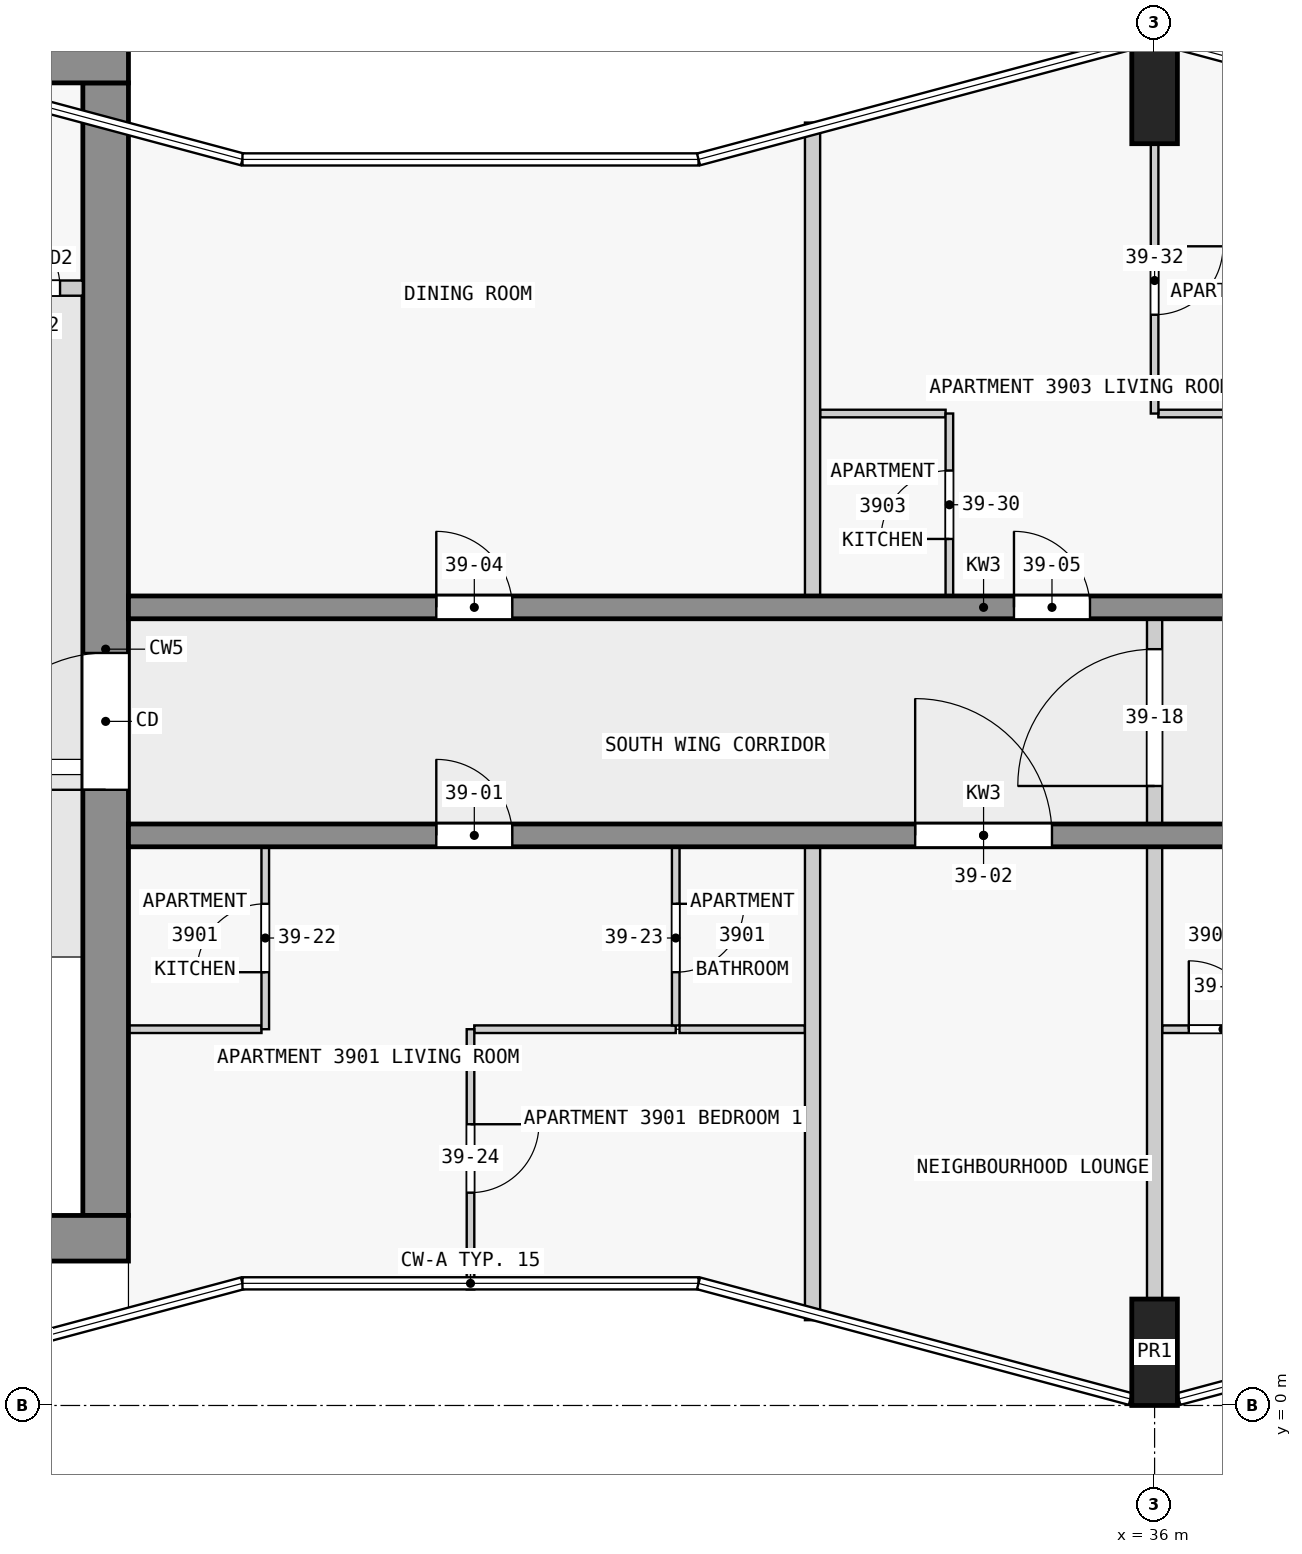
"""IFC4 building model, lengths in metres.
Left out: names, types, materials, properties, quantities, classifications, styles, units other than length and angle.
Written with IfcOpenShell. Run it as: python <this file> out.ifc"""

import sys

from ifc_helpers import new_model, si_unit, direction, frame, frame_2d, origin, origin_2d, place, context, subcontext, project, spatial, rectangle, extrude, element, fill, save


model = new_model("IFC4")
c1 = context("Model", 3, precision=1e-05, world=origin(), true_north=direction((0.0, 1.0)))
c2 = subcontext(c1, "Body", "Model", "MODEL_VIEW")
j1 = project(units=[si_unit("LENGTHUNIT", "METRE"), si_unit("PLANEANGLEUNIT", "RADIAN")], contexts=[c1])
p1 = place(None, origin())
s1 = spatial("IfcSite", under=j1, at=p1, CompositionType="ELEMENT")
p2 = place(p1, origin())
s2 = spatial("IfcBuilding", under=s1, at=p2, CompositionType="ELEMENT")
p3 = place(p2, frame((0.0, 0.0, 153.4)))
s3 = spatial("IfcBuildingStorey", under=s2, at=p3, CompositionType="ELEMENT", Elevation=153.4)
for number, where, z_axis, x_axis in (
    (1, (36.0, 0.7, 0.0), (0.0, 0.0, 1.0), (1.0, 0.0, 0.0)),
    (2, (36.0, 17.3, 0.0), (0.0, 0.0, 1.0), (1.0, 0.0, 0.0)),
):
    element("IfcColumn", number, at=place(p3, frame(where, z_axis=z_axis, x_axis=x_axis)), inside=s3, PredefinedType="COLUMN", context=c2, shape_type="SweptSolid", body=[
        extrude(rectangle(XDim=0.6, YDim=1.4, at=origin_2d()), origin(), (0.0, 0.0, 1.0), 3.5),
    ])
p4 = place(p3, frame((1.7, 2.2, 0.0), z_axis=(0.0, 0.0, 1.0), x_axis=(1.0, 0.0, 0.0)))
e3 = element("IfcWall", 3, at=p4, inside=s3, PredefinedType="SHEAR", context=c2, shape_type="SweptSolid", body=[
    extrude(rectangle(XDim=20.8, YDim=0.6, at=frame_2d((10.4, 0.0))), origin(), (0.0, 0.0, 1.0), 3.25),
])
p5 = place(p3, frame((1.38, 17.7, 0.0), z_axis=(0.0, 0.0, 1.0), x_axis=(1.0, 0.0, 0.0)))
e4 = element("IfcWall", 4, at=p5, inside=s3, PredefinedType="SHEAR", context=c2, shape_type="SweptSolid", body=[
    extrude(rectangle(XDim=21.12, YDim=0.6, at=frame_2d((10.56, 0.0))), origin(), (0.0, 0.0, 1.0), 3.25),
])
p6 = place(p5, frame((6.4, 0.0, 0.0)))
e5 = element("IfcOpeningElement", 5, at=p6, cuts=e4, PredefinedType="OPENING", context=c2, shape_type="SweptSolid", body=[
    extrude(rectangle(XDim=1.8, YDim=2.1, at=frame_2d((0.9, 1.05))), frame((0.0, 0.31, 0.0), z_axis=(0.0, -1.0, 0.0), x_axis=(1.0, 0.0, 0.0)), (0.0, 0.0, 1.0), 0.62),
])
p7 = place(p3, frame((22.2, 2.5, 0.0), z_axis=(0.0, 0.0, 1.0), x_axis=(0.0, 1.0, 0.0)))
e6 = element("IfcWall", 6, at=p7, inside=s3, PredefinedType="SHEAR", context=c2, shape_type="SweptSolid", body=[
    extrude(rectangle(XDim=14.9, YDim=0.6, at=frame_2d((7.45, 0.0))), origin(), (0.0, 0.0, 1.0), 3.25),
])
p8 = place(p7, frame((5.6, 0.0, 0.0)))
e7 = element("IfcOpeningElement", 7, at=p8, cuts=e6, PredefinedType="OPENING", context=c2, shape_type="SweptSolid", body=[
    extrude(rectangle(XDim=1.8, YDim=2.1, at=frame_2d((0.9, 1.05))), frame((0.0, 0.31, 0.0), z_axis=(0.0, -1.0, 0.0), x_axis=(1.0, 0.0, 0.0)), (0.0, 0.0, 1.0), 0.62),
])
p9 = place(p3, frame((22.5, 7.5, 0.0), z_axis=(0.0, 0.0, 1.0), x_axis=(1.0, 0.0, 0.0)))
e8 = element("IfcWall", 8, at=p9, inside=s3, PredefinedType="SHEAR", context=c2, shape_type="SweptSolid", body=[
    extrude(rectangle(XDim=22.5, YDim=0.3, at=frame_2d((11.25, 0.0))), origin(), (0.0, 0.0, 1.0), 3.25),
])
p10 = place(p9, frame((4.05, 0.0, 0.0)))
e9 = element("IfcOpeningElement", 9, at=p10, cuts=e8, PredefinedType="OPENING", context=c2, shape_type="SweptSolid", body=[
    extrude(rectangle(XDim=1.0, YDim=2.1, at=frame_2d((0.5, 1.05))), frame((0.0, 0.16, 0.0), z_axis=(0.0, -1.0, 0.0), x_axis=(1.0, 0.0, 0.0)), (0.0, 0.0, 1.0), 0.32),
])
p11 = place(p9, frame((10.35, 0.0, 0.0)))
e10 = element("IfcOpeningElement", 10, at=p11, cuts=e8, PredefinedType="OPENING", context=c2, shape_type="SweptSolid", body=[
    extrude(rectangle(XDim=1.8, YDim=2.1, at=frame_2d((0.9, 1.05))), frame((0.0, 0.16, 0.0), z_axis=(0.0, -1.0, 0.0), x_axis=(1.0, 0.0, 0.0)), (0.0, 0.0, 1.0), 0.32),
])
p12 = place(p9, frame((16.85, 0.0, 0.0)))
e11 = element("IfcOpeningElement", 11, at=p12, cuts=e8, PredefinedType="OPENING", context=c2, shape_type="SweptSolid", body=[
    extrude(rectangle(XDim=1.0, YDim=2.1, at=frame_2d((0.5, 1.05))), frame((0.0, 0.16, 0.0), z_axis=(0.0, -1.0, 0.0), x_axis=(1.0, 0.0, 0.0)), (0.0, 0.0, 1.0), 0.32),
])
p13 = place(p3, frame((22.5, 10.5, 0.0), z_axis=(0.0, 0.0, 1.0), x_axis=(1.0, 0.0, 0.0)))
e12 = element("IfcWall", 12, at=p13, inside=s3, PredefinedType="SHEAR", context=c2, shape_type="SweptSolid", body=[
    extrude(rectangle(XDim=22.5, YDim=0.3, at=frame_2d((11.25, 0.0))), origin(), (0.0, 0.0, 1.0), 3.25),
])
p14 = place(p13, frame((4.05, 0.0, 0.0)))
e13 = element("IfcOpeningElement", 13, at=p14, cuts=e12, PredefinedType="OPENING", context=c2, shape_type="SweptSolid", body=[
    extrude(rectangle(XDim=1.0, YDim=2.1, at=frame_2d((0.5, 1.05))), frame((0.0, 0.16, 0.0), z_axis=(0.0, -1.0, 0.0), x_axis=(1.0, 0.0, 0.0)), (0.0, 0.0, 1.0), 0.32),
])
p15 = place(p13, frame((11.65, 0.0, 0.0)))
e14 = element("IfcOpeningElement", 14, at=p15, cuts=e12, PredefinedType="OPENING", context=c2, shape_type="SweptSolid", body=[
    extrude(rectangle(XDim=1.0, YDim=2.1, at=frame_2d((0.5, 1.05))), frame((0.0, 0.16, 0.0), z_axis=(0.0, -1.0, 0.0), x_axis=(1.0, 0.0, 0.0)), (0.0, 0.0, 1.0), 0.32),
])
p16 = place(p13, frame((18.75, 0.0, 0.0)))
e15 = element("IfcOpeningElement", 15, at=p16, cuts=e12, PredefinedType="OPENING", context=c2, shape_type="SweptSolid", body=[
    extrude(rectangle(XDim=0.9, YDim=2.1, at=frame_2d((0.45, 1.05))), frame((0.0, 0.16, 0.0), z_axis=(0.0, -1.0, 0.0), x_axis=(1.0, 0.0, 0.0)), (0.0, 0.0, 1.0), 0.32),
])
p17 = place(p13, frame((20.95, 0.0, 0.0)))
e16 = element("IfcOpeningElement", 16, at=p17, cuts=e12, PredefinedType="OPENING", context=c2, shape_type="SweptSolid", body=[
    extrude(rectangle(XDim=1.0, YDim=2.1, at=frame_2d((0.5, 1.05))), frame((0.0, 0.16, 0.0), z_axis=(0.0, -1.0, 0.0), x_axis=(1.0, 0.0, 0.0)), (0.0, 0.0, 1.0), 0.32),
])
p18 = place(p3, frame((18.6, 14.7, 0.0), z_axis=(0.0, 0.0, 1.0), x_axis=(1.0, 0.0, 0.0)))
e17 = element("IfcWall", 17, at=p18, inside=s3, PredefinedType="PARTITIONING", context=c2, shape_type="SweptSolid", body=[
    extrude(rectangle(XDim=3.3, YDim=0.2, at=frame_2d((1.65, 0.0))), origin(), (0.0, 0.0, 1.0), 3.25),
])
p19 = place(p18, frame((0.45, 0.0, 0.0)))
e18 = element("IfcOpeningElement", 18, at=p19, cuts=e17, PredefinedType="OPENING", context=c2, shape_type="SweptSolid", body=[
    extrude(rectangle(XDim=0.9, YDim=2.1, at=frame_2d((0.45, 1.05))), frame((0.0, 0.11, 0.0), z_axis=(0.0, -1.0, 0.0), x_axis=(1.0, 0.0, 0.0)), (0.0, 0.0, 1.0), 0.22),
])
p20 = place(p18, frame((2.1, 0.0, 0.0)))
e19 = element("IfcOpeningElement", 19, at=p20, cuts=e17, PredefinedType="OPENING", context=c2, shape_type="SweptSolid", body=[
    extrude(rectangle(XDim=0.9, YDim=2.1, at=frame_2d((0.45, 1.05))), frame((0.0, 0.11, 0.0), z_axis=(0.0, -1.0, 0.0), x_axis=(1.0, 0.0, 0.0)), (0.0, 0.0, 1.0), 0.22),
])
p21 = place(p3, frame((29.7, 4.95, 0.0), z_axis=(0.0, 0.0, 1.0), x_axis=(-1.0, 0.0, 0.0)))
e20 = element("IfcWall", 20, at=p21, inside=s3, PredefinedType="PARTITIONING", context=c2, shape_type="SweptSolid", body=[
    extrude(rectangle(XDim=2.65, YDim=0.1, at=frame_2d((1.325, 0.0))), origin(), (0.0, 0.0, 1.0), 3.25),
])
p22 = place(p3, frame((22.5, 4.95, 0.0), z_axis=(0.0, 0.0, 1.0), x_axis=(1.0, 0.0, 0.0)))
e21 = element("IfcWall", 21, at=p22, inside=s3, PredefinedType="PARTITIONING", context=c2, shape_type="SweptSolid", body=[
    extrude(rectangle(XDim=1.75, YDim=0.1, at=frame_2d((0.875, 0.0))), origin(), (0.0, 0.0, 1.0), 3.25),
])
p23 = place(p3, frame((29.75, 4.95, 0.0), z_axis=(0.0, 0.0, 1.0), x_axis=(1.0, 0.0, 0.0)))
e22 = element("IfcWall", 22, at=p23, inside=s3, PredefinedType="PARTITIONING", context=c2, shape_type="SweptSolid", body=[
    extrude(rectangle(XDim=1.65, YDim=0.1, at=frame_2d((0.825, 0.0))), origin(), (0.0, 0.0, 1.0), 3.25),
])
p24 = place(p3, frame((36.1, 4.95, 0.0), z_axis=(0.0, 0.0, 1.0), x_axis=(1.0, 0.0, 0.0)))
e23 = element("IfcWall", 23, at=p24, inside=s3, PredefinedType="PARTITIONING", context=c2, shape_type="SweptSolid", body=[
    extrude(rectangle(XDim=3.0, YDim=0.1, at=frame_2d((1.5, 0.0))), origin(), (0.0, 0.0, 1.0), 3.25),
])
p25 = place(p24, frame((0.35, 0.0, 0.0)))
e24 = element("IfcOpeningElement", 24, at=p25, cuts=e23, PredefinedType="OPENING", context=c2, shape_type="SweptSolid", body=[
    extrude(rectangle(XDim=0.9, YDim=2.1, at=frame_2d((0.45, 1.05))), frame((0.0, 0.06, 0.0), z_axis=(0.0, -1.0, 0.0), x_axis=(1.0, 0.0, 0.0)), (0.0, 0.0, 1.0), 0.12),
])
p26 = place(p3, frame((33.25, 13.05, 0.0), z_axis=(0.0, 0.0, 1.0), x_axis=(-1.0, 0.0, 0.0)))
e25 = element("IfcWall", 25, at=p26, inside=s3, PredefinedType="PARTITIONING", context=c2, shape_type="SweptSolid", body=[
    extrude(rectangle(XDim=1.65, YDim=0.1, at=frame_2d((0.825, 0.0))), origin(), (0.0, 0.0, 1.0), 3.25),
])
p27 = place(p3, frame((36.05, 13.05, 0.0), z_axis=(0.0, 0.0, 1.0), x_axis=(1.0, 0.0, 0.0)))
e26 = element("IfcWall", 26, at=p27, inside=s3, PredefinedType="PARTITIONING", context=c2, shape_type="SweptSolid", body=[
    extrude(rectangle(XDim=2.65, YDim=0.1, at=frame_2d((1.325, 0.0))), origin(), (0.0, 0.0, 1.0), 3.25),
])
p28 = place(p3, frame((24.3, 4.95, 0.0), z_axis=(0.0, 0.0, 1.0), x_axis=(0.0, 1.0, 0.0)))
e27 = element("IfcWall", 27, at=p28, inside=s3, PredefinedType="PARTITIONING", context=c2, shape_type="SweptSolid", body=[
    extrude(rectangle(XDim=2.4, YDim=0.1, at=frame_2d((1.2, 0.0))), origin(), (0.0, 0.0, 1.0), 3.25),
])
p29 = place(p28, frame((0.75, 0.0, 0.0)))
e28 = element("IfcOpeningElement", 28, at=p29, cuts=e27, PredefinedType="OPENING", context=c2, shape_type="SweptSolid", body=[
    extrude(rectangle(XDim=0.9, YDim=2.1, at=frame_2d((0.45, 1.05))), frame((0.0, 0.06, 0.0), z_axis=(0.0, -1.0, 0.0), x_axis=(1.0, 0.0, 0.0)), (0.0, 0.0, 1.0), 0.12),
])
p30 = place(p3, frame((27.0, 4.95, 0.0), z_axis=(0.0, 0.0, 1.0), x_axis=(0.0, -1.0, 0.0)))
e29 = element("IfcWall", 29, at=p30, inside=s3, PredefinedType="PARTITIONING", context=c2, shape_type="SweptSolid", body=[
    extrude(rectangle(XDim=3.423, YDim=0.1, at=frame_2d((1.711, 0.0))), origin(), (0.0, 0.0, 1.0), 3.25),
])
p31 = place(p30, frame((1.25, 0.0, 0.0)))
e30 = element("IfcOpeningElement", 30, at=p31, cuts=e29, PredefinedType="OPENING", context=c2, shape_type="SweptSolid", body=[
    extrude(rectangle(XDim=0.9, YDim=2.1, at=frame_2d((0.45, 1.05))), frame((0.0, 0.06, 0.0), z_axis=(0.0, -1.0, 0.0), x_axis=(1.0, 0.0, 0.0)), (0.0, 0.0, 1.0), 0.12),
])
p32 = place(p3, frame((29.7, 7.35, 0.0), z_axis=(0.0, 0.0, 1.0), x_axis=(0.0, -1.0, 0.0)))
e31 = element("IfcWall", 31, at=p32, inside=s3, PredefinedType="PARTITIONING", context=c2, shape_type="SweptSolid", body=[
    extrude(rectangle(XDim=2.35, YDim=0.1, at=frame_2d((1.175, 0.0))), origin(), (0.0, 0.0, 1.0), 3.25),
])
p33 = place(p32, frame((0.75, 0.0, 0.0)))
e32 = element("IfcOpeningElement", 32, at=p33, cuts=e31, PredefinedType="OPENING", context=c2, shape_type="SweptSolid", body=[
    extrude(rectangle(XDim=0.9, YDim=2.1, at=frame_2d((0.45, 1.05))), frame((0.0, 0.06, 0.0), z_axis=(0.0, -1.0, 0.0), x_axis=(1.0, 0.0, 0.0)), (0.0, 0.0, 1.0), 0.12),
])
for number, where, z_axis, x_axis in (
    (33, (31.5, 1.122, 0.0), (0.0, 0.0, 1.0), (0.0, 1.0, 0.0)),
    (34, (31.5, 10.65, 0.0), (0.0, 0.0, 1.0), (0.0, 1.0, 0.0)),
):
    element("IfcWall", number, at=place(p3, frame(where, z_axis=z_axis, x_axis=x_axis)), inside=s3, PredefinedType="PARTITIONING", context=c2, shape_type="SweptSolid", body=[
        extrude(rectangle(XDim=6.228, YDim=0.2, at=frame_2d((3.114, 0.0))), origin(), (0.0, 0.0, 1.0), 3.25),
    ])
p34 = place(p3, frame((33.3, 10.65, 0.0), z_axis=(0.0, 0.0, 1.0), x_axis=(0.0, 1.0, 0.0)))
e35 = element("IfcWall", 35, at=p34, inside=s3, PredefinedType="PARTITIONING", context=c2, shape_type="SweptSolid", body=[
    extrude(rectangle(XDim=2.4, YDim=0.1, at=frame_2d((1.2, 0.0))), origin(), (0.0, 0.0, 1.0), 3.25),
])
p35 = place(p34, frame((0.75, 0.0, 0.0)))
e36 = element("IfcOpeningElement", 36, at=p35, cuts=e35, PredefinedType="OPENING", context=c2, shape_type="SweptSolid", body=[
    extrude(rectangle(XDim=0.9, YDim=2.1, at=frame_2d((0.45, 1.05))), frame((0.0, 0.06, 0.0), z_axis=(0.0, -1.0, 0.0), x_axis=(1.0, 0.0, 0.0)), (0.0, 0.0, 1.0), 0.12),
])
p36 = place(p3, frame((36.0, 16.6, 0.0), z_axis=(0.0, 0.0, 1.0), x_axis=(0.0, -1.0, 0.0)))
e37 = element("IfcWall", 37, at=p36, inside=s3, PredefinedType="PARTITIONING", context=c2, shape_type="SweptSolid", body=[
    extrude(rectangle(XDim=3.55, YDim=0.1, at=frame_2d((1.775, 0.0))), origin(), (0.0, 0.0, 1.0), 3.25),
])
p37 = place(p36, frame((1.35, 0.0, 0.0)))
e38 = element("IfcOpeningElement", 38, at=p37, cuts=e37, PredefinedType="OPENING", context=c2, shape_type="SweptSolid", body=[
    extrude(rectangle(XDim=0.9, YDim=2.1, at=frame_2d((0.45, 1.05))), frame((0.0, 0.06, 0.0), z_axis=(0.0, -1.0, 0.0), x_axis=(1.0, 0.0, 0.0)), (0.0, 0.0, 1.0), 0.12),
])
p38 = place(p3, frame((36.0, 1.4, 0.0), z_axis=(0.0, 0.0, 1.0), x_axis=(0.0, 1.0, 0.0)))
e39 = element("IfcWall", 39, at=p38, inside=s3, PredefinedType="PARTITIONING", context=c2, shape_type="SweptSolid", body=[
    extrude(rectangle(XDim=5.95, YDim=0.2, at=frame_2d((2.975, 0.0))), origin(), (0.0, 0.0, 1.0), 3.25),
])
p39 = place(p3, frame((36.0, 7.45, 0.0), z_axis=(0.0, 0.0, 1.0), x_axis=(0.0, 1.0, 0.0)))
e40 = element("IfcWall", 40, at=p39, inside=s3, PredefinedType="PARTITIONING", context=c2, shape_type="SweptSolid", body=[
    extrude(rectangle(XDim=3.2, YDim=0.2, at=frame_2d((1.6, 0.0))), origin(), (0.0, 0.0, 1.0), 3.25),
])
p40 = place(p39, frame((0.7, 0.0, 0.0)))
e41 = element("IfcOpeningElement", 41, at=p40, cuts=e40, PredefinedType="OPENING", context=c2, shape_type="SweptSolid", body=[
    extrude(rectangle(XDim=1.8, YDim=2.1, at=frame_2d((0.9, 1.05))), frame((0.0, 0.11, 0.0), z_axis=(0.0, -1.0, 0.0), x_axis=(1.0, 0.0, 0.0)), (0.0, 0.0, 1.0), 0.22),
])
p41 = place(p8, origin())
e42 = element("IfcDoor", 42, at=p41, inside=s3, OperationType="DOUBLE_DOOR_SINGLE_SWING", PredefinedType="DOOR", context=c2, shape_type="SweptSolid", body=[
    extrude(rectangle(XDim=1.8, YDim=2.1, at=frame_2d((0.9, 1.05))), frame((0.0, 0.025, 0.0), z_axis=(0.0, -1.0, 0.0), x_axis=(1.0, 0.0, 0.0)), (0.0, 0.0, 1.0), 0.05),
])
fill(e7, e42)
p42 = place(p20, origin())
e43 = element("IfcDoor", 43, at=p42, inside=s3, OperationType="SINGLE_SWING_LEFT", PredefinedType="DOOR", context=c2, shape_type="SweptSolid", body=[
    extrude(rectangle(XDim=0.9, YDim=2.1, at=frame_2d((0.45, 1.05))), frame((0.0, 0.025, 0.0), z_axis=(0.0, -1.0, 0.0), x_axis=(1.0, 0.0, 0.0)), (0.0, 0.0, 1.0), 0.05),
])
fill(e19, e43)
p43 = place(p10, origin())
e44 = element("IfcDoor", 44, at=p43, inside=s3, OperationType="SINGLE_SWING_LEFT", PredefinedType="DOOR", context=c2, shape_type="SweptSolid", body=[
    extrude(rectangle(XDim=1.0, YDim=2.1, at=frame_2d((0.5, 1.05))), frame((0.0, 0.025, 0.0), z_axis=(0.0, -1.0, 0.0), x_axis=(1.0, 0.0, 0.0)), (0.0, 0.0, 1.0), 0.05),
])
fill(e9, e44)
p44 = place(p11, origin())
e45 = element("IfcDoor", 45, at=p44, inside=s3, OperationType="SINGLE_SWING_LEFT", PredefinedType="DOOR", context=c2, shape_type="SweptSolid", body=[
    extrude(rectangle(XDim=1.8, YDim=2.1, at=frame_2d((0.9, 1.05))), frame((0.0, 0.025, 0.0), z_axis=(0.0, -1.0, 0.0), x_axis=(1.0, 0.0, 0.0)), (0.0, 0.0, 1.0), 0.05),
])
fill(e10, e45)
p45 = place(p14, origin())
e46 = element("IfcDoor", 46, at=p45, inside=s3, OperationType="SINGLE_SWING_LEFT", PredefinedType="DOOR", context=c2, shape_type="SweptSolid", body=[
    extrude(rectangle(XDim=1.0, YDim=2.1, at=frame_2d((0.5, 1.05))), frame((0.0, 0.025, 0.0), z_axis=(0.0, -1.0, 0.0), x_axis=(1.0, 0.0, 0.0)), (0.0, 0.0, 1.0), 0.05),
])
fill(e13, e46)
p46 = place(p15, origin())
e47 = element("IfcDoor", 47, at=p46, inside=s3, OperationType="SINGLE_SWING_RIGHT", PredefinedType="DOOR", context=c2, shape_type="SweptSolid", body=[
    extrude(rectangle(XDim=1.0, YDim=2.1, at=frame_2d((0.5, 1.05))), frame((0.0, 0.025, 0.0), z_axis=(0.0, -1.0, 0.0), x_axis=(1.0, 0.0, 0.0)), (0.0, 0.0, 1.0), 0.05),
])
fill(e14, e47)
p47 = place(p40, origin())
e48 = element("IfcDoor", 48, at=p47, inside=s3, OperationType="SINGLE_SWING_LEFT", PredefinedType="DOOR", context=c2, shape_type="SweptSolid", body=[
    extrude(rectangle(XDim=1.8, YDim=2.1, at=frame_2d((0.9, 1.05))), frame((0.0, 0.025, 0.0), z_axis=(0.0, -1.0, 0.0), x_axis=(1.0, 0.0, 0.0)), (0.0, 0.0, 1.0), 0.05),
])
fill(e41, e48)
p48 = place(p29, origin())
e49 = element("IfcDoor", 49, at=p48, inside=s3, OperationType="SINGLE_SWING_RIGHT", PredefinedType="DOOR", context=c2, shape_type="SweptSolid", body=[
    extrude(rectangle(XDim=0.9, YDim=2.1, at=frame_2d((0.45, 1.05))), frame((0.0, 0.025, 0.0), z_axis=(0.0, -1.0, 0.0), x_axis=(1.0, 0.0, 0.0)), (0.0, 0.0, 1.0), 0.05),
])
fill(e28, e49)
p49 = place(p33, origin())
e50 = element("IfcDoor", 50, at=p49, inside=s3, OperationType="SINGLE_SWING_RIGHT", PredefinedType="DOOR", context=c2, shape_type="SweptSolid", body=[
    extrude(rectangle(XDim=0.9, YDim=2.1, at=frame_2d((0.45, 1.05))), frame((0.0, 0.025, 0.0), z_axis=(0.0, -1.0, 0.0), x_axis=(1.0, 0.0, 0.0)), (0.0, 0.0, 1.0), 0.05),
])
fill(e32, e50)
p50 = place(p31, origin())
e51 = element("IfcDoor", 51, at=p50, inside=s3, OperationType="SINGLE_SWING_LEFT", PredefinedType="DOOR", context=c2, shape_type="SweptSolid", body=[
    extrude(rectangle(XDim=0.9, YDim=2.1, at=frame_2d((0.45, 1.05))), frame((0.0, 0.025, 0.0), z_axis=(0.0, -1.0, 0.0), x_axis=(1.0, 0.0, 0.0)), (0.0, 0.0, 1.0), 0.05),
])
fill(e30, e51)
p51 = place(p25, origin())
e52 = element("IfcDoor", 52, at=p51, inside=s3, OperationType="SINGLE_SWING_LEFT", PredefinedType="DOOR", context=c2, shape_type="SweptSolid", body=[
    extrude(rectangle(XDim=0.9, YDim=2.1, at=frame_2d((0.45, 1.05))), frame((0.0, 0.025, 0.0), z_axis=(0.0, -1.0, 0.0), x_axis=(1.0, 0.0, 0.0)), (0.0, 0.0, 1.0), 0.05),
])
fill(e24, e52)
p52 = place(p35, origin())
e53 = element("IfcDoor", 53, at=p52, inside=s3, OperationType="SINGLE_SWING_LEFT", PredefinedType="DOOR", context=c2, shape_type="SweptSolid", body=[
    extrude(rectangle(XDim=0.9, YDim=2.1, at=frame_2d((0.45, 1.05))), frame((0.0, 0.025, 0.0), z_axis=(0.0, -1.0, 0.0), x_axis=(1.0, 0.0, 0.0)), (0.0, 0.0, 1.0), 0.05),
])
fill(e36, e53)
p53 = place(p37, origin())
e54 = element("IfcDoor", 54, at=p53, inside=s3, OperationType="SINGLE_SWING_RIGHT", PredefinedType="DOOR", context=c2, shape_type="SweptSolid", body=[
    extrude(rectangle(XDim=0.9, YDim=2.1, at=frame_2d((0.45, 1.05))), frame((0.0, 0.025, 0.0), z_axis=(0.0, -1.0, 0.0), x_axis=(1.0, 0.0, 0.0)), (0.0, 0.0, 1.0), 0.05),
])
fill(e38, e54)
save(model, sys.argv[1])
